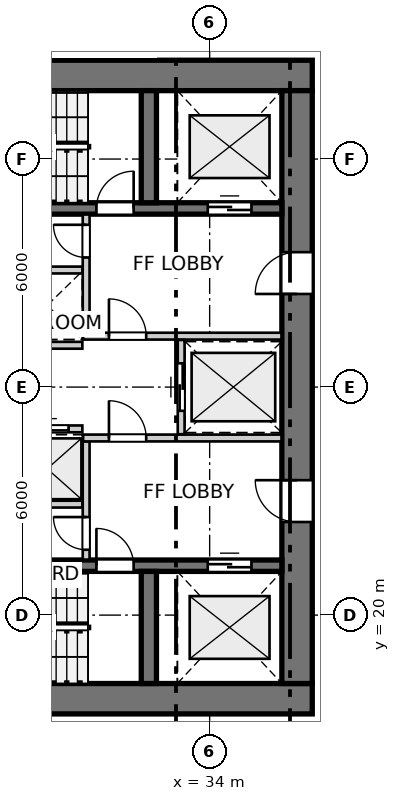
"""IFC4 building model, lengths in metres.
Left out: names, types, materials, properties, quantities, classifications, styles, units other than length and angle.
Written with IfcOpenShell. Run it as: python <this file> out.ifc"""

import sys

from ifc_helpers import new_model, si_unit, direction, frame, frame_2d, origin, place, context, subcontext, project, spatial, rectangle, extrude, source, transform, mapped, element, fill, save


model = new_model("IFC4")
c1 = context("Model", 3, precision=1e-05, world=origin(), true_north=direction((0.0, 1.0)))
c2 = subcontext(c1, "Body", "Model", "MODEL_VIEW")
j1 = project(units=[si_unit("LENGTHUNIT", "METRE"), si_unit("PLANEANGLEUNIT", "RADIAN")], contexts=[c1])
p1 = place(None, origin())
s1 = spatial("IfcSite", under=j1, at=p1, CompositionType="ELEMENT")
p2 = place(p1, origin())
s2 = spatial("IfcBuilding", under=s1, at=p2, CompositionType="ELEMENT")
p3 = place(p2, frame((0.0, 0.0, 33.4)))
s3 = spatial("IfcBuildingStorey", under=s2, at=p3, CompositionType="ELEMENT", Elevation=33.4)
for number, where, z_axis, x_axis in (
    (1, (24.0, 17.8, 0.0), (0.0, 0.0, 1.0), (1.0, 0.0, 0.0)),
    (2, (36.7, 34.2, 0.0), (0.0, 0.0, 1.0), (-1.0, 0.0, 0.0)),
):
    element("IfcWall", number, at=place(p3, frame(where, z_axis=z_axis, x_axis=x_axis)), inside=s3, PredefinedType="SHEAR", context=c2, shape_type="SweptSolid", body=[
        extrude(rectangle(XDim=12.7, YDim=0.8, at=frame_2d((6.35, 0.0))), origin(), (0.0, 0.0, 1.0), 2.94),
    ])
p4 = place(p3, frame((36.3, 18.2, 0.0), z_axis=(0.0, 0.0, 1.0), x_axis=(0.0, 1.0, 0.0)))
e3 = element("IfcWall", 3, at=p4, inside=s3, PredefinedType="SHEAR", context=c2, shape_type="SweptSolid", body=[
    extrude(rectangle(XDim=15.6, YDim=0.8, at=frame_2d((7.8, 0.0))), origin(), (0.0, 0.0, 1.0), 2.94),
])
p5 = place(p4, frame((4.25, 0.0, 0.0)))
e4 = element("IfcOpeningElement", 4, at=p5, cuts=e3, PredefinedType="OPENING", context=c2, shape_type="SweptSolid", body=[
    extrude(rectangle(XDim=1.1, YDim=2.15, at=frame_2d((0.55, 1.075))), frame((0.0, 0.41, 0.0), z_axis=(0.0, -1.0, 0.0), x_axis=(1.0, 0.0, 0.0)), (0.0, 0.0, 1.0), 0.82),
])
p6 = place(p4, frame((10.25, 0.0, 0.0)))
e5 = element("IfcOpeningElement", 5, at=p6, cuts=e3, PredefinedType="OPENING", context=c2, shape_type="SweptSolid", body=[
    extrude(rectangle(XDim=1.1, YDim=2.15, at=frame_2d((0.55, 1.075))), frame((0.0, 0.41, 0.0), z_axis=(0.0, -1.0, 0.0), x_axis=(1.0, 0.0, 0.0)), (0.0, 0.0, 1.0), 0.82),
])
p7 = place(p3, frame((24.8, 21.3, 0.0), z_axis=(0.0, 0.0, 1.0), x_axis=(1.0, 0.0, 0.0)))
e6 = element("IfcWall", 6, at=p7, inside=s3, PredefinedType="SHEAR", context=c2, shape_type="SweptSolid", body=[
    extrude(rectangle(XDim=11.1, YDim=0.3, at=frame_2d((5.55, 0.0))), origin(), (0.0, 0.0, 1.0), 2.94),
])
p8 = place(p7, frame((6.22, 0.0, 0.0)))
e7 = element("IfcOpeningElement", 7, at=p8, cuts=e6, PredefinedType="OPENING", context=c2, shape_type="SweptSolid", body=[
    extrude(rectangle(XDim=0.98, YDim=2.15, at=frame_2d((0.49, 1.075))), frame((0.0, 0.16, 0.0), z_axis=(0.0, -1.0, 0.0), x_axis=(1.0, 0.0, 0.0)), (0.0, 0.0, 1.0), 0.32),
])
p9 = place(p7, frame((9.15, 0.0, 0.0)))
e8 = element("IfcOpeningElement", 8, at=p9, cuts=e6, PredefinedType="OPENING", context=c2, shape_type="SweptSolid", body=[
    extrude(rectangle(XDim=1.15, YDim=2.15, at=frame_2d((0.575, 1.075))), frame((0.0, 0.16, 0.0), z_axis=(0.0, -1.0, 0.0), x_axis=(1.0, 0.0, 0.0)), (0.0, 0.0, 1.0), 0.32),
])
p10 = place(p3, frame((32.4, 18.2, 0.0), z_axis=(0.0, 0.0, 1.0), x_axis=(0.0, 1.0, 0.0)))
e9 = element("IfcWall", 9, at=p10, inside=s3, PredefinedType="SHEAR", context=c2, shape_type="SweptSolid", body=[
    extrude(rectangle(XDim=2.95, YDim=0.4, at=frame_2d((1.475, 0.0))), origin(), (0.0, 0.0, 1.0), 2.94),
])
p11 = place(p3, frame((24.8, 30.7, 0.0), z_axis=(0.0, 0.0, 1.0), x_axis=(1.0, 0.0, 0.0)))
e10 = element("IfcWall", 10, at=p11, inside=s3, PredefinedType="SHEAR", context=c2, shape_type="SweptSolid", body=[
    extrude(rectangle(XDim=11.1, YDim=0.3, at=frame_2d((5.55, 0.0))), origin(), (0.0, 0.0, 1.0), 2.94),
])
p12 = place(p11, frame((6.22, 0.0, 0.0)))
e11 = element("IfcOpeningElement", 11, at=p12, cuts=e10, PredefinedType="OPENING", context=c2, shape_type="SweptSolid", body=[
    extrude(rectangle(XDim=0.98, YDim=2.15, at=frame_2d((0.49, 1.075))), frame((0.0, 0.16, 0.0), z_axis=(0.0, -1.0, 0.0), x_axis=(1.0, 0.0, 0.0)), (0.0, 0.0, 1.0), 0.32),
])
p13 = place(p11, frame((9.15, 0.0, 0.0)))
e12 = element("IfcOpeningElement", 12, at=p13, cuts=e10, PredefinedType="OPENING", context=c2, shape_type="SweptSolid", body=[
    extrude(rectangle(XDim=1.15, YDim=2.15, at=frame_2d((0.575, 1.075))), frame((0.0, 0.16, 0.0), z_axis=(0.0, -1.0, 0.0), x_axis=(1.0, 0.0, 0.0)), (0.0, 0.0, 1.0), 0.32),
])
p14 = place(p3, frame((32.4, 30.85, 0.0), z_axis=(0.0, 0.0, 1.0), x_axis=(0.0, 1.0, 0.0)))
e13 = element("IfcWall", 13, at=p14, inside=s3, PredefinedType="SHEAR", context=c2, shape_type="SweptSolid", body=[
    extrude(rectangle(XDim=2.95, YDim=0.4, at=frame_2d((1.475, 0.0))), origin(), (0.0, 0.0, 1.0), 2.94),
])
p15 = place(p3, frame((30.75, 21.46, 0.0), z_axis=(0.0, 0.0, 1.0), x_axis=(0.0, 1.0, 0.0)))
e14 = element("IfcWall", 14, at=p15, inside=s3, PredefinedType="PARTITIONING", context=c2, shape_type="SweptSolid", body=[
    extrude(rectangle(XDim=3.11, YDim=0.18, at=frame_2d((1.555, 0.0))), origin(), (0.0, 0.0, 1.0), 2.94),
])
p16 = place(p15, frame((0.26, 0.0, 0.0)))
e15 = element("IfcOpeningElement", 15, at=p16, cuts=e14, PredefinedType="OPENING", context=c2, shape_type="SweptSolid", body=[
    extrude(rectangle(XDim=0.86, YDim=2.05, at=frame_2d((0.43, 1.025))), frame((0.0, 0.1, 0.0), z_axis=(0.0, -1.0, 0.0), x_axis=(1.0, 0.0, 0.0)), (0.0, 0.0, 1.0), 0.2),
])
p17 = place(p3, frame((30.67, 24.66, 0.0), z_axis=(0.0, 0.0, 1.0), x_axis=(1.0, 0.0, 0.0)))
e16 = element("IfcWall", 16, at=p17, inside=s3, PredefinedType="PARTITIONING", context=c2, shape_type="SweptSolid", body=[
    extrude(rectangle(XDim=5.22, YDim=0.18, at=frame_2d((2.61, 0.0))), origin(), (0.0, 0.0, 1.0), 2.94),
])
p18 = place(p17, frame((0.68, 0.0, 0.0)))
e17 = element("IfcOpeningElement", 17, at=p18, cuts=e16, PredefinedType="OPENING", context=c2, shape_type="SweptSolid", body=[
    extrude(rectangle(XDim=0.98, YDim=2.15, at=frame_2d((0.49, 1.075))), frame((0.0, 0.1, 0.0), z_axis=(0.0, -1.0, 0.0), x_axis=(1.0, 0.0, 0.0)), (0.0, 0.0, 1.0), 0.2),
])
p19 = place(p3, frame((30.75, 27.43, 0.0), z_axis=(0.0, 0.0, 1.0), x_axis=(0.0, 1.0, 0.0)))
e18 = element("IfcWall", 18, at=p19, inside=s3, PredefinedType="PARTITIONING", context=c2, shape_type="SweptSolid", body=[
    extrude(rectangle(XDim=3.11, YDim=0.18, at=frame_2d((1.555, 0.0))), origin(), (0.0, 0.0, 1.0), 2.94),
])
p20 = place(p19, frame((1.98, 0.0, 0.0)))
e19 = element("IfcOpeningElement", 19, at=p20, cuts=e18, PredefinedType="OPENING", context=c2, shape_type="SweptSolid", body=[
    extrude(rectangle(XDim=0.86, YDim=2.05, at=frame_2d((0.43, 1.025))), frame((0.0, 0.1, 0.0), z_axis=(0.0, -1.0, 0.0), x_axis=(1.0, 0.0, 0.0)), (0.0, 0.0, 1.0), 0.2),
])
p21 = place(p3, frame((30.67, 27.34, 0.0), z_axis=(0.0, 0.0, 1.0), x_axis=(1.0, 0.0, 0.0)))
e20 = element("IfcWall", 20, at=p21, inside=s3, PredefinedType="PARTITIONING", context=c2, shape_type="SweptSolid", body=[
    extrude(rectangle(XDim=5.22, YDim=0.18, at=frame_2d((2.61, 0.0))), origin(), (0.0, 0.0, 1.0), 2.94),
])
p22 = place(p21, frame((0.68, 0.0, 0.0)))
e21 = element("IfcOpeningElement", 21, at=p22, cuts=e20, PredefinedType="OPENING", context=c2, shape_type="SweptSolid", body=[
    extrude(rectangle(XDim=0.98, YDim=2.15, at=frame_2d((0.49, 1.075))), frame((0.0, 0.1, 0.0), z_axis=(0.0, -1.0, 0.0), x_axis=(1.0, 0.0, 0.0)), (0.0, 0.0, 1.0), 0.2),
])
p23 = place(p3, frame((33.25, 24.76, 0.0), z_axis=(0.0, 0.0, 1.0), x_axis=(0.0, 1.0, 0.0)))
e22 = element("IfcWall", 22, at=p23, inside=s3, PredefinedType="PARTITIONING", context=c2, shape_type="SweptSolid", body=[
    extrude(rectangle(XDim=2.48, YDim=0.18, at=frame_2d((1.24, 0.0))), origin(), (0.0, 0.0, 1.0), 2.94),
])
p24 = place(p23, frame((0.615, 0.0, 0.0)))
e23 = element("IfcOpeningElement", 23, at=p24, cuts=e22, PredefinedType="OPENING", context=c2, shape_type="SweptSolid", body=[
    extrude(rectangle(XDim=1.25, YDim=2.15, at=frame_2d((0.625, 1.075))), frame((0.0, 0.1, 0.0), z_axis=(0.0, -1.0, 0.0), x_axis=(1.0, 0.0, 0.0)), (0.0, 0.0, 1.0), 0.2),
])
p25 = place(p3, frame((24.81, 22.92, 0.0), z_axis=(0.0, 0.0, 1.0), x_axis=(1.0, 0.0, 0.0)))
e24 = element("IfcWall", 24, at=p25, inside=s3, PredefinedType="PARTITIONING", context=c2, shape_type="SweptSolid", body=[
    extrude(rectangle(XDim=5.84, YDim=0.18, at=frame_2d((2.92, 0.0))), origin(), (0.0, 0.0, 1.0), 2.94),
])
p26 = place(p3, frame((28.825, 24.9, 0.0), z_axis=(0.0, 0.0, 1.0), x_axis=(1.0, 0.0, 0.0)))
e25 = element("IfcWall", 25, at=p26, inside=s3, PredefinedType="PARTITIONING", context=c2, shape_type="SweptSolid", body=[
    extrude(rectangle(XDim=1.825, YDim=0.18, at=frame_2d((0.913, 0.0))), origin(), (0.0, 0.0, 1.0), 2.94),
])
p27 = place(p26, frame((0.363, 0.0, 0.0)))
e26 = element("IfcOpeningElement", 26, at=p27, cuts=e25, PredefinedType="OPENING", context=c2, shape_type="SweptSolid", body=[
    extrude(rectangle(XDim=1.1, YDim=2.15, at=frame_2d((0.55, 1.075))), frame((0.0, 0.1, 0.0), z_axis=(0.0, -1.0, 0.0), x_axis=(1.0, 0.0, 0.0)), (0.0, 0.0, 1.0), 0.2),
])
p28 = place(p3, frame((24.81, 29.08, 0.0), z_axis=(0.0, 0.0, 1.0), x_axis=(1.0, 0.0, 0.0)))
e27 = element("IfcWall", 27, at=p28, inside=s3, PredefinedType="PARTITIONING", context=c2, shape_type="SweptSolid", body=[
    extrude(rectangle(XDim=5.84, YDim=0.18, at=frame_2d((2.92, 0.0))), origin(), (0.0, 0.0, 1.0), 2.94),
])
p29 = place(p3, frame((28.825, 27.1, 0.0), z_axis=(0.0, 0.0, 1.0), x_axis=(1.0, 0.0, 0.0)))
e28 = element("IfcWall", 28, at=p29, inside=s3, PredefinedType="PARTITIONING", context=c2, shape_type="SweptSolid", body=[
    extrude(rectangle(XDim=1.825, YDim=0.18, at=frame_2d((0.913, 0.0))), origin(), (0.0, 0.0, 1.0), 2.94),
])
m1 = source(origin(), c2, "Body", "SweptSolid", [
    extrude(rectangle(XDim=0.98, YDim=2.15, at=frame_2d((0.49, 1.075))), frame((0.0, 0.025, 0.0), z_axis=(0.0, -1.0, 0.0), x_axis=(1.0, 0.0, 0.0)), (0.0, 0.0, 1.0), 0.05),
])
p30 = place(p8, origin())
e29 = element("IfcDoor", 29, at=p30, inside=s3, OperationType="SINGLE_SWING_LEFT", PredefinedType="DOOR", context=c2, shape_type="MappedRepresentation", body=[
    mapped(m1, transform((0.0, 0.0, 0.0), x_axis=(1.0, 0.0, 0.0), y_axis=(0.0, 1.0, 0.0), z_axis=(0.0, 0.0, 1.0), scale=1.0)),
])
fill(e7, e29)
m2 = source(origin(), c2, "Body", "SweptSolid", [
    extrude(rectangle(XDim=1.15, YDim=2.15, at=frame_2d((0.575, 1.075))), frame((0.0, 0.025, 0.0), z_axis=(0.0, -1.0, 0.0), x_axis=(1.0, 0.0, 0.0)), (0.0, 0.0, 1.0), 0.05),
])
p31 = place(p9, origin())
e30 = element("IfcDoor", 30, at=p31, inside=s3, OperationType="DOUBLE_DOOR_SLIDING", PredefinedType="DOOR", context=c2, shape_type="MappedRepresentation", body=[
    mapped(m2, transform((0.0, 0.0, 0.0), x_axis=(1.0, 0.0, 0.0), y_axis=(0.0, 1.0, 0.0), z_axis=(0.0, 0.0, 1.0), scale=1.0)),
])
fill(e8, e30)
p32 = place(p12, origin())
e31 = element("IfcDoor", 31, at=p32, inside=s3, OperationType="SINGLE_SWING_RIGHT", PredefinedType="DOOR", context=c2, shape_type="MappedRepresentation", body=[
    mapped(m1, transform((0.0, 0.0, 0.0), x_axis=(1.0, 0.0, 0.0), y_axis=(0.0, 1.0, 0.0), z_axis=(0.0, 0.0, 1.0), scale=1.0)),
])
fill(e11, e31)
p33 = place(p13, origin())
e32 = element("IfcDoor", 32, at=p33, inside=s3, OperationType="DOUBLE_DOOR_SLIDING", PredefinedType="DOOR", context=c2, shape_type="MappedRepresentation", body=[
    mapped(m2, transform((0.0, 0.0, 0.0), x_axis=(1.0, 0.0, 0.0), y_axis=(0.0, 1.0, 0.0), z_axis=(0.0, 0.0, 1.0), scale=1.0)),
])
fill(e12, e32)
m3 = source(origin(), c2, "Body", "SweptSolid", [
    extrude(rectangle(XDim=1.1, YDim=2.15, at=frame_2d((0.55, 1.075))), frame((0.0, 0.025, 0.0), z_axis=(0.0, -1.0, 0.0), x_axis=(1.0, 0.0, 0.0)), (0.0, 0.0, 1.0), 0.05),
])
p34 = place(p5, origin())
e33 = element("IfcDoor", 33, at=p34, inside=s3, OperationType="SINGLE_SWING_RIGHT", PredefinedType="DOOR", context=c2, shape_type="MappedRepresentation", body=[
    mapped(m3, transform((0.0, 0.0, 0.0), x_axis=(1.0, 0.0, 0.0), y_axis=(0.0, 1.0, 0.0), z_axis=(0.0, 0.0, 1.0), scale=1.0)),
])
fill(e4, e33)
p35 = place(p6, origin())
e34 = element("IfcDoor", 34, at=p35, inside=s3, OperationType="SINGLE_SWING_LEFT", PredefinedType="DOOR", context=c2, shape_type="MappedRepresentation", body=[
    mapped(m3, transform((0.0, 0.0, 0.0), x_axis=(1.0, 0.0, 0.0), y_axis=(0.0, 1.0, 0.0), z_axis=(0.0, 0.0, 1.0), scale=1.0)),
])
fill(e5, e34)
m4 = source(origin(), c2, "Body", "SweptSolid", [
    extrude(rectangle(XDim=0.86, YDim=2.05, at=frame_2d((0.43, 1.025))), frame((0.0, 0.025, 0.0), z_axis=(0.0, -1.0, 0.0), x_axis=(1.0, 0.0, 0.0)), (0.0, 0.0, 1.0), 0.05),
])
p36 = place(p16, origin())
e35 = element("IfcDoor", 35, at=p36, inside=s3, OperationType="SINGLE_SWING_RIGHT", PredefinedType="DOOR", context=c2, shape_type="MappedRepresentation", body=[
    mapped(m4, transform((0.0, 0.0, 0.0), x_axis=(1.0, 0.0, 0.0), y_axis=(0.0, 1.0, 0.0), z_axis=(0.0, 0.0, 1.0), scale=1.0)),
])
fill(e15, e35)
p37 = place(p18, origin())
e36 = element("IfcDoor", 36, at=p37, inside=s3, OperationType="SINGLE_SWING_LEFT", PredefinedType="DOOR", context=c2, shape_type="MappedRepresentation", body=[
    mapped(m1, transform((0.0, 0.0, 0.0), x_axis=(1.0, 0.0, 0.0), y_axis=(0.0, 1.0, 0.0), z_axis=(0.0, 0.0, 1.0), scale=1.0)),
])
fill(e17, e36)
p38 = place(p20, origin())
e37 = element("IfcDoor", 37, at=p38, inside=s3, OperationType="SINGLE_SWING_RIGHT", PredefinedType="DOOR", context=c2, shape_type="MappedRepresentation", body=[
    mapped(m4, transform((0.0, 0.0, 0.0), x_axis=(1.0, 0.0, 0.0), y_axis=(0.0, 1.0, 0.0), z_axis=(0.0, 0.0, 1.0), scale=1.0)),
])
fill(e19, e37)
p39 = place(p22, origin())
e38 = element("IfcDoor", 38, at=p39, inside=s3, OperationType="SINGLE_SWING_LEFT", PredefinedType="DOOR", context=c2, shape_type="MappedRepresentation", body=[
    mapped(m1, transform((0.0, 0.0, 0.0), x_axis=(1.0, 0.0, 0.0), y_axis=(0.0, 1.0, 0.0), z_axis=(0.0, 0.0, 1.0), scale=1.0)),
])
fill(e21, e38)
m5 = source(origin(), c2, "Body", "SweptSolid", [
    extrude(rectangle(XDim=1.25, YDim=2.15, at=frame_2d((0.625, 1.075))), frame((0.0, 0.025, 0.0), z_axis=(0.0, -1.0, 0.0), x_axis=(1.0, 0.0, 0.0)), (0.0, 0.0, 1.0), 0.05),
])
p40 = place(p24, origin())
e39 = element("IfcDoor", 39, at=p40, inside=s3, OperationType="DOUBLE_DOOR_SLIDING", PredefinedType="DOOR", context=c2, shape_type="MappedRepresentation", body=[
    mapped(m5, transform((0.0, 0.0, 0.0), x_axis=(1.0, 0.0, 0.0), y_axis=(0.0, 1.0, 0.0), z_axis=(0.0, 0.0, 1.0), scale=1.0)),
])
fill(e23, e39)
p41 = place(p27, origin())
e40 = element("IfcDoor", 40, at=p41, inside=s3, OperationType="DOUBLE_DOOR_SLIDING", PredefinedType="DOOR", context=c2, shape_type="MappedRepresentation", body=[
    mapped(m3, transform((0.0, 0.0, 0.0), x_axis=(1.0, 0.0, 0.0), y_axis=(0.0, 1.0, 0.0), z_axis=(0.0, 0.0, 1.0), scale=1.0)),
])
fill(e26, e40)
save(model, sys.argv[1])
